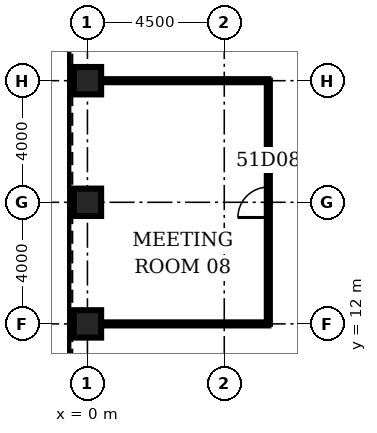
"""IFC4 building model, lengths in metres.
Left out: names, types, materials, properties, quantities, classifications, styles, units other than length and angle.
Written with IfcOpenShell. Run it as: python <this file> out.ifc"""

import sys

from ifc_helpers import new_model, si_unit, direction, frame, frame_2d, origin, origin_2d, place, context, subcontext, project, spatial, rectangle, hollow_rectangle, extrude, element, fill, save


model = new_model("IFC4")
c1 = context("Model", 3, precision=1e-05, world=origin(), true_north=direction((0.0, 1.0)))
c2 = subcontext(c1, "Body", "Model", "MODEL_VIEW")
j1 = project(units=[si_unit("LENGTHUNIT", "METRE"), si_unit("PLANEANGLEUNIT", "RADIAN")], contexts=[c1])
p1 = place(None, origin())
s1 = spatial("IfcSite", under=j1, at=p1, CompositionType="ELEMENT")
p2 = place(p1, origin())
s2 = spatial("IfcBuilding", under=s1, at=p2, CompositionType="ELEMENT")
p3 = place(p2, frame((0.0, 0.0, 227.8)))
s3 = spatial("IfcBuildingStorey", under=s2, at=p3, CompositionType="ELEMENT", Elevation=227.8)
for number, where, z_axis, x_axis in (
    (1, (0.0, 20.0, 0.0), (0.0, 0.0, 1.0), (1.0, 0.0, 0.0)),
    (2, (0.0, 16.0, 0.0), (0.0, 0.0, 1.0), (1.0, 0.0, 0.0)),
    (3, (0.0, 12.0, 0.0), (0.0, 0.0, 1.0), (1.0, 0.0, 0.0)),
):
    element("IfcColumn", number, at=place(p3, frame(where, z_axis=z_axis, x_axis=x_axis)), inside=s3, PredefinedType="COLUMN", context=c2, shape_type="SweptSolid", body=[
        extrude(hollow_rectangle(XDim=0.9, YDim=0.9, WallThickness=0.08, at=origin_2d()), origin(), (0.0, 0.0, 1.0), 4.2),
    ])
for number, where, z_axis, x_axis in (
    (4, (0.45, 12.0, 0.0), (0.0, 0.0, 1.0), (1.0, 0.0, 0.0)),
    (5, (0.45, 20.0, 0.0), (0.0, 0.0, 1.0), (1.0, 0.0, 0.0)),
):
    element("IfcWall", number, at=place(p3, frame(where, z_axis=z_axis, x_axis=x_axis)), inside=s3, PredefinedType="PARTITIONING", context=c2, shape_type="SweptSolid", body=[
        extrude(rectangle(XDim=5.5, YDim=0.1, at=frame_2d((2.75, 0.0))), origin(), (0.0, 0.0, 1.0), 3.0),
    ])
p4 = place(p3, frame((5.95, 12.0, 0.0), z_axis=(0.0, 0.0, 1.0), x_axis=(0.0, 1.0, 0.0)))
e6 = element("IfcWall", 6, at=p4, inside=s3, PredefinedType="PARTITIONING", context=c2, shape_type="SweptSolid", body=[
    extrude(rectangle(XDim=8.0, YDim=0.1, at=frame_2d((4.0, 0.0))), origin(), (0.0, 0.0, 1.0), 3.0),
])
p5 = place(p4, frame((3.5, 0.0, 0.0)))
e7 = element("IfcOpeningElement", 7, at=p5, cuts=e6, PredefinedType="OPENING", context=c2, shape_type="SweptSolid", body=[
    extrude(rectangle(XDim=1.0, YDim=2.1, at=frame_2d((0.5, 1.05))), frame((0.0, 0.06, 0.0), z_axis=(0.0, -1.0, 0.0), x_axis=(1.0, 0.0, 0.0)), (0.0, 0.0, 1.0), 0.12),
])
p6 = place(p5, origin())
e8 = element("IfcDoor", 8, at=p6, inside=s3, OperationType="SINGLE_SWING_LEFT", PredefinedType="DOOR", context=c2, shape_type="SweptSolid", body=[
    extrude(rectangle(XDim=1.0, YDim=2.1, at=frame_2d((0.5, 1.05))), frame((0.0, 0.025, 0.0), z_axis=(0.0, -1.0, 0.0), x_axis=(1.0, 0.0, 0.0)), (0.0, 0.0, 1.0), 0.05),
])
fill(e7, e8)
save(model, sys.argv[1])
